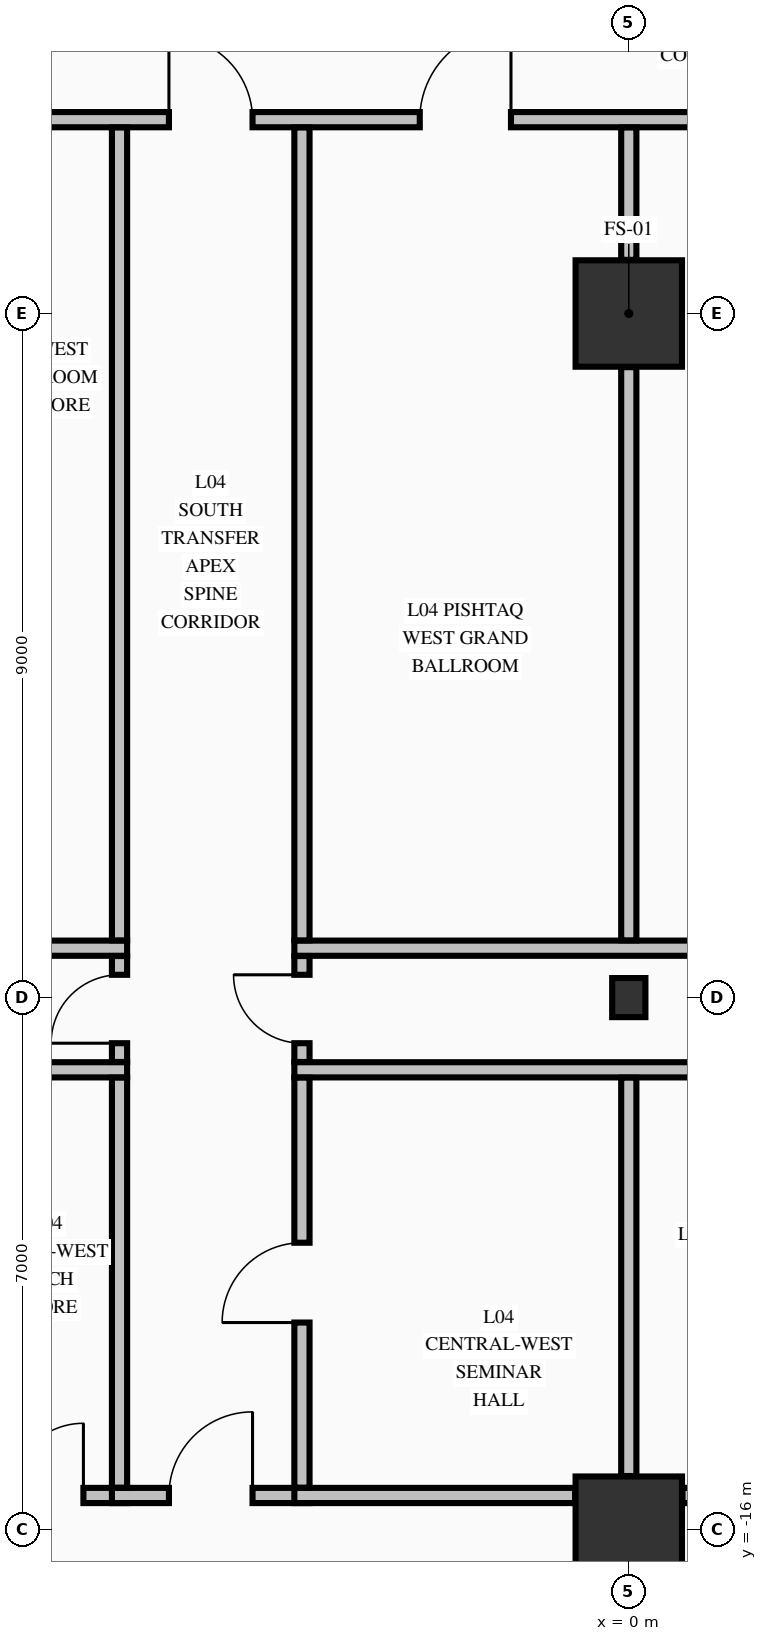
"""IFC4 building model, lengths in metres.
Left out: names, types, materials, properties, quantities, classifications, styles, units other than length and angle.
Written with IfcOpenShell. Run it as: python <this file> out.ifc"""

import sys

from ifc_helpers import new_model, si_unit, direction, frame, frame_2d, origin, origin_2d, place, context, subcontext, project, spatial, rectangle, i_section, extrude, element, fill, save


model = new_model("IFC4")
c1 = context("Model", 3, precision=1e-05, world=origin(), true_north=direction((0.0, 1.0)))
c2 = subcontext(c1, "Body", "Model", "MODEL_VIEW")
j1 = project(units=[si_unit("LENGTHUNIT", "METRE"), si_unit("PLANEANGLEUNIT", "RADIAN")], contexts=[c1])
p1 = place(None, origin())
s1 = spatial("IfcSite", under=j1, at=p1, CompositionType="ELEMENT")
p2 = place(p1, origin())
s2 = spatial("IfcBuilding", under=s1, at=p2, CompositionType="ELEMENT")
p3 = place(p2, frame((0.0, 0.0, 21.76)))
s3 = spatial("IfcBuildingStorey", under=s2, at=p3, CompositionType="ELEMENT", Elevation=21.76)
p4 = place(p3, frame((0.0, -16.0, -0.45), z_axis=(0.0, 0.0, 1.0), x_axis=(1.0, 0.0, 0.0)))
e1 = element("IfcColumn", 1, at=p4, inside=s3, PredefinedType="COLUMN", context=c2, shape_type="SweptSolid", body=[
    extrude(rectangle(XDim=1.4, YDim=1.4, at=origin_2d()), origin(), (0.0, 0.0, 1.0), 5.44),
])
p5 = place(p3, frame((0.0, -9.0, -0.45), z_axis=(0.0, 0.0, 1.0), x_axis=(1.0, 0.0, 0.0)))
e2 = element("IfcColumn", 2, at=p5, inside=s3, PredefinedType="COLUMN", context=c2, shape_type="SweptSolid", body=[
    extrude(i_section(OverallWidth=0.437, OverallDepth=0.514, WebThickness=0.061, FlangeThickness=0.097, FilletRadius=0.015, at=origin_2d()), origin(), (0.0, 0.0, 1.0), 5.44),
])
p6 = place(p3, frame((0.0, 0.0, -0.45), z_axis=(0.0, 0.0, 1.0), x_axis=(1.0, 0.0, 0.0)))
e3 = element("IfcColumn", 3, at=p6, inside=s3, PredefinedType="COLUMN", context=c2, shape_type="SweptSolid", body=[
    extrude(rectangle(XDim=1.4, YDim=1.4, at=origin_2d()), origin(), (0.0, 0.0, 1.0), 5.44),
])
p7 = place(p3, frame((-8.7, -15.55, 0.0), z_axis=(0.0, 0.0, 1.0), x_axis=(1.0, 0.0, 0.0)))
e4 = element("IfcWall", 4, at=p7, inside=s3, PredefinedType="PARTITIONING", context=c2, shape_type="SweptSolid", body=[
    extrude(rectangle(XDim=2.1, YDim=0.2, at=frame_2d((1.05, 0.0))), origin(), (0.0, 0.0, 1.0), 3.332),
])
p8 = place(p7, frame((0.575, 0.0, 0.0)))
e5 = element("IfcOpeningElement", 5, at=p8, cuts=e4, PredefinedType="OPENING", context=c2, shape_type="SweptSolid", body=[
    extrude(rectangle(XDim=0.95, YDim=2.15, at=frame_2d((0.475, 1.075))), frame((0.0, 0.11, 0.0), z_axis=(0.0, -1.0, 0.0), x_axis=(1.0, 0.0, 0.0)), (0.0, 0.0, 1.0), 0.22),
])
p9 = place(p3, frame((-6.8, -15.55, 0.0), z_axis=(0.0, 0.0, 1.0), x_axis=(1.0, 0.0, 0.0)))
e6 = element("IfcWall", 6, at=p9, inside=s3, PredefinedType="PARTITIONING", context=c2, shape_type="SweptSolid", body=[
    extrude(rectangle(XDim=2.6, YDim=0.2, at=frame_2d((1.3, 0.0))), origin(), (0.0, 0.0, 1.0), 3.332),
])
p10 = place(p9, frame((0.75, 0.0, 0.0)))
e7 = element("IfcOpeningElement", 7, at=p10, cuts=e6, PredefinedType="OPENING", context=c2, shape_type="SweptSolid", body=[
    extrude(rectangle(XDim=1.1, YDim=2.15, at=frame_2d((0.55, 1.075))), frame((0.0, 0.11, 0.0), z_axis=(0.0, -1.0, 0.0), x_axis=(1.0, 0.0, 0.0)), (0.0, 0.0, 1.0), 0.22),
])
p11 = place(p3, frame((-4.4, -15.55, 0.0), z_axis=(0.0, 0.0, 1.0), x_axis=(1.0, 0.0, 0.0)))
e8 = element("IfcWall", 8, at=p11, inside=s3, PredefinedType="PARTITIONING", context=c2, shape_type="SweptSolid", body=[
    extrude(rectangle(XDim=3.694, YDim=0.2, at=frame_2d((1.847, 0.0))), origin(), (0.0, 0.0, 1.0), 3.332),
])
p12 = place(p3, frame((0.706, -15.55, 0.0), z_axis=(0.0, 0.0, 1.0), x_axis=(1.0, 0.0, 0.0)))
e9 = element("IfcWall", 9, at=p12, inside=s3, PredefinedType="PARTITIONING", context=c2, shape_type="SweptSolid", body=[
    extrude(rectangle(XDim=7.994, YDim=0.2, at=frame_2d((3.997, 0.0))), origin(), (0.0, 0.0, 1.0), 3.332),
])
p13 = place(p12, frame((2.994, 0.0, 0.0)))
e10 = element("IfcOpeningElement", 10, at=p13, cuts=e9, PredefinedType="OPENING", context=c2, shape_type="SweptSolid", body=[
    extrude(rectangle(XDim=1.2, YDim=2.15, at=frame_2d((0.6, 1.075))), frame((0.0, 0.11, 0.0), z_axis=(0.0, -1.0, 0.0), x_axis=(1.0, 0.0, 0.0)), (0.0, 0.0, 1.0), 0.22),
])
p14 = place(p3, frame((-11.0, -9.95, 0.0), z_axis=(0.0, 0.0, 1.0), x_axis=(1.0, 0.0, 0.0)))
e11 = element("IfcWall", 11, at=p14, inside=s3, PredefinedType="PARTITIONING", context=c2, shape_type="SweptSolid", body=[
    extrude(rectangle(XDim=4.4, YDim=0.2, at=frame_2d((2.2, 0.0))), origin(), (0.0, 0.0, 1.0), 3.332),
])
p15 = place(p3, frame((-4.4, -9.95, 0.0), z_axis=(0.0, 0.0, 1.0), x_axis=(1.0, 0.0, 0.0)))
e12 = element("IfcWall", 12, at=p15, inside=s3, PredefinedType="PARTITIONING", context=c2, shape_type="SweptSolid", body=[
    extrude(rectangle(XDim=15.4, YDim=0.2, at=frame_2d((7.7, 0.0))), origin(), (0.0, 0.0, 1.0), 3.332),
])
p16 = place(p3, frame((-10.194, -8.35, 0.0), z_axis=(0.0, 0.0, 1.0), x_axis=(1.0, 0.0, 0.0)))
e13 = element("IfcWall", 13, at=p16, inside=s3, PredefinedType="PARTITIONING", context=c2, shape_type="SweptSolid", body=[
    extrude(rectangle(XDim=3.594, YDim=0.2, at=frame_2d((1.797, 0.0))), origin(), (0.0, 0.0, 1.0), 3.332),
])
p17 = place(p3, frame((-4.4, -8.35, 0.0), z_axis=(0.0, 0.0, 1.0), x_axis=(1.0, 0.0, 0.0)))
e14 = element("IfcWall", 14, at=p17, inside=s3, PredefinedType="PARTITIONING", context=c2, shape_type="SweptSolid", body=[
    extrude(rectangle(XDim=14.594, YDim=0.2, at=frame_2d((7.297, 0.0))), origin(), (0.0, 0.0, 1.0), 3.332),
])
p18 = place(p3, frame((-8.7, 2.55, 0.0), z_axis=(0.0, 0.0, 1.0), x_axis=(1.0, 0.0, 0.0)))
e15 = element("IfcWall", 15, at=p18, inside=s3, PredefinedType="PARTITIONING", context=c2, shape_type="SweptSolid", body=[
    extrude(rectangle(XDim=17.4, YDim=0.2, at=frame_2d((8.7, 0.0))), origin(), (0.0, 0.0, 1.0), 4.99),
])
p19 = place(p18, frame((2.65, 0.0, 0.0)))
e16 = element("IfcOpeningElement", 16, at=p19, cuts=e15, PredefinedType="OPENING", context=c2, shape_type="SweptSolid", body=[
    extrude(rectangle(XDim=1.1, YDim=2.15, at=frame_2d((0.55, 1.075))), frame((0.0, 0.11, 0.0), z_axis=(0.0, -1.0, 0.0), x_axis=(1.0, 0.0, 0.0)), (0.0, 0.0, 1.0), 0.22),
])
p20 = place(p18, frame((5.95, 0.0, 0.0)))
e17 = element("IfcOpeningElement", 17, at=p20, cuts=e15, PredefinedType="OPENING", context=c2, shape_type="SweptSolid", body=[
    extrude(rectangle(XDim=1.2, YDim=2.15, at=frame_2d((0.6, 1.075))), frame((0.0, 0.11, 0.0), z_axis=(0.0, -1.0, 0.0), x_axis=(1.0, 0.0, 0.0)), (0.0, 0.0, 1.0), 0.22),
])
p21 = place(p3, frame((-6.7, -15.447, 0.0), z_axis=(0.0, 0.0, 1.0), x_axis=(0.0, 1.0, 0.0)))
e18 = element("IfcWall", 18, at=p21, inside=s3, PredefinedType="PARTITIONING", context=c2, shape_type="SweptSolid", body=[
    extrude(rectangle(XDim=5.394, YDim=0.2, at=frame_2d((2.697, 0.0))), origin(), (0.0, 0.0, 1.0), 4.99),
])
p22 = place(p3, frame((-6.7, -9.847, 0.0), z_axis=(0.0, 0.0, 1.0), x_axis=(0.0, 1.0, 0.0)))
e19 = element("IfcWall", 19, at=p22, inside=s3, PredefinedType="PARTITIONING", context=c2, shape_type="SweptSolid", body=[
    extrude(rectangle(XDim=1.394, YDim=0.2, at=frame_2d((0.697, 0.0))), origin(), (0.0, 0.0, 1.0), 4.99),
])
p23 = place(p22, frame((0.247, 0.0, 0.0)))
e20 = element("IfcOpeningElement", 20, at=p23, cuts=e19, PredefinedType="OPENING", context=c2, shape_type="SweptSolid", body=[
    extrude(rectangle(XDim=0.9, YDim=2.15, at=frame_2d((0.45, 1.075))), frame((0.0, 0.11, 0.0), z_axis=(0.0, -1.0, 0.0), x_axis=(1.0, 0.0, 0.0)), (0.0, 0.0, 1.0), 0.22),
])
p24 = place(p3, frame((-6.7, -8.247, 0.0), z_axis=(0.0, 0.0, 1.0), x_axis=(0.0, 1.0, 0.0)))
e21 = element("IfcWall", 21, at=p24, inside=s3, PredefinedType="PARTITIONING", context=c2, shape_type="SweptSolid", body=[
    extrude(rectangle(XDim=10.694, YDim=0.2, at=frame_2d((5.347, 0.0))), origin(), (0.0, 0.0, 1.0), 4.99),
])
p25 = place(p3, frame((-4.3, -15.447, 0.0), z_axis=(0.0, 0.0, 1.0), x_axis=(0.0, 1.0, 0.0)))
e22 = element("IfcWall", 22, at=p25, inside=s3, PredefinedType="PARTITIONING", context=c2, shape_type="SweptSolid", body=[
    extrude(rectangle(XDim=5.394, YDim=0.2, at=frame_2d((2.697, 0.0))), origin(), (0.0, 0.0, 1.0), 4.99),
])
p26 = place(p25, frame((2.172, 0.0, 0.0)))
e23 = element("IfcOpeningElement", 23, at=p26, cuts=e22, PredefinedType="OPENING", context=c2, shape_type="SweptSolid", body=[
    extrude(rectangle(XDim=1.05, YDim=2.15, at=frame_2d((0.525, 1.075))), frame((0.0, 0.11, 0.0), z_axis=(0.0, -1.0, 0.0), x_axis=(1.0, 0.0, 0.0)), (0.0, 0.0, 1.0), 0.22),
])
p27 = place(p3, frame((-4.3, -9.847, 0.0), z_axis=(0.0, 0.0, 1.0), x_axis=(0.0, 1.0, 0.0)))
e24 = element("IfcWall", 24, at=p27, inside=s3, PredefinedType="PARTITIONING", context=c2, shape_type="SweptSolid", body=[
    extrude(rectangle(XDim=1.394, YDim=0.2, at=frame_2d((0.697, 0.0))), origin(), (0.0, 0.0, 1.0), 4.99),
])
p28 = place(p27, frame((0.247, 0.0, 0.0)))
e25 = element("IfcOpeningElement", 25, at=p28, cuts=e24, PredefinedType="OPENING", context=c2, shape_type="SweptSolid", body=[
    extrude(rectangle(XDim=0.9, YDim=2.15, at=frame_2d((0.45, 1.075))), frame((0.0, 0.11, 0.0), z_axis=(0.0, -1.0, 0.0), x_axis=(1.0, 0.0, 0.0)), (0.0, 0.0, 1.0), 0.22),
])
p29 = place(p3, frame((-4.3, -8.247, 0.0), z_axis=(0.0, 0.0, 1.0), x_axis=(0.0, 1.0, 0.0)))
e26 = element("IfcWall", 26, at=p29, inside=s3, PredefinedType="PARTITIONING", context=c2, shape_type="SweptSolid", body=[
    extrude(rectangle(XDim=10.694, YDim=0.2, at=frame_2d((5.347, 0.0))), origin(), (0.0, 0.0, 1.0), 4.99),
])
p30 = place(p3, frame((0.0, -15.294, 0.0), z_axis=(0.0, 0.0, 1.0), x_axis=(0.0, 1.0, 0.0)))
e27 = element("IfcWall", 27, at=p30, inside=s3, PredefinedType="PARTITIONING", context=c2, shape_type="SweptSolid", body=[
    extrude(rectangle(XDim=5.241, YDim=0.2, at=frame_2d((2.621, 0.0))), origin(), (0.0, 0.0, 1.0), 3.332),
])
p31 = place(p3, frame((0.0, -8.247, 0.0), z_axis=(0.0, 0.0, 1.0), x_axis=(0.0, 1.0, 0.0)))
e28 = element("IfcWall", 28, at=p31, inside=s3, PredefinedType="PARTITIONING", context=c2, shape_type="SweptSolid", body=[
    extrude(rectangle(XDim=7.541, YDim=0.2, at=frame_2d((3.771, 0.0))), origin(), (0.0, 0.0, 1.0), 3.332),
])
p32 = place(p3, frame((0.0, 0.706, 0.0), z_axis=(0.0, 0.0, 1.0), x_axis=(0.0, 1.0, 0.0)))
e29 = element("IfcWall", 29, at=p32, inside=s3, PredefinedType="PARTITIONING", context=c2, shape_type="SweptSolid", body=[
    extrude(rectangle(XDim=1.741, YDim=0.2, at=frame_2d((0.871, 0.0))), origin(), (0.0, 0.0, 1.0), 3.332),
])
p33 = place(p10, origin())
e30 = element("IfcDoor", 30, at=p33, inside=s3, OperationType="SINGLE_SWING_RIGHT", PredefinedType="DOOR", context=c2, shape_type="SweptSolid", body=[
    extrude(rectangle(XDim=1.1, YDim=2.15, at=frame_2d((0.55, 1.075))), frame((0.0, 0.025, 0.0), z_axis=(0.0, -1.0, 0.0), x_axis=(1.0, 0.0, 0.0)), (0.0, 0.0, 1.0), 0.05),
])
fill(e7, e30)
p34 = place(p19, origin())
e31 = element("IfcDoor", 31, at=p34, inside=s3, OperationType="SINGLE_SWING_LEFT", PredefinedType="DOOR", context=c2, shape_type="SweptSolid", body=[
    extrude(rectangle(XDim=1.1, YDim=2.15, at=frame_2d((0.55, 1.075))), frame((0.0, 0.025, 0.0), z_axis=(0.0, -1.0, 0.0), x_axis=(1.0, 0.0, 0.0)), (0.0, 0.0, 1.0), 0.05),
])
fill(e16, e31)
p35 = place(p8, origin())
e32 = element("IfcDoor", 32, at=p35, inside=s3, OperationType="SINGLE_SWING_RIGHT", PredefinedType="DOOR", context=c2, shape_type="SweptSolid", body=[
    extrude(rectangle(XDim=0.95, YDim=2.15, at=frame_2d((0.475, 1.075))), frame((0.0, 0.025, 0.0), z_axis=(0.0, -1.0, 0.0), x_axis=(1.0, 0.0, 0.0)), (0.0, 0.0, 1.0), 0.05),
])
fill(e5, e32)
p36 = place(p26, origin())
e33 = element("IfcDoor", 33, at=p36, inside=s3, OperationType="SINGLE_SWING_LEFT", PredefinedType="DOOR", context=c2, shape_type="SweptSolid", body=[
    extrude(rectangle(XDim=1.05, YDim=2.15, at=frame_2d((0.525, 1.075))), frame((0.0, 0.025, 0.0), z_axis=(0.0, -1.0, 0.0), x_axis=(1.0, 0.0, 0.0)), (0.0, 0.0, 1.0), 0.05),
])
fill(e23, e33)
p37 = place(p23, origin())
e34 = element("IfcDoor", 34, at=p37, inside=s3, OperationType="SINGLE_SWING_LEFT", PredefinedType="DOOR", context=c2, shape_type="SweptSolid", body=[
    extrude(rectangle(XDim=0.9, YDim=2.15, at=frame_2d((0.45, 1.075))), frame((0.0, 0.025, 0.0), z_axis=(0.0, -1.0, 0.0), x_axis=(1.0, 0.0, 0.0)), (0.0, 0.0, 1.0), 0.05),
])
fill(e20, e34)
p38 = place(p28, origin())
e35 = element("IfcDoor", 35, at=p38, inside=s3, OperationType="SINGLE_SWING_RIGHT", PredefinedType="DOOR", context=c2, shape_type="SweptSolid", body=[
    extrude(rectangle(XDim=0.9, YDim=2.15, at=frame_2d((0.45, 1.075))), frame((0.0, 0.025, 0.0), z_axis=(0.0, -1.0, 0.0), x_axis=(1.0, 0.0, 0.0)), (0.0, 0.0, 1.0), 0.05),
])
fill(e25, e35)
p39 = place(p20, origin())
e36 = element("IfcDoor", 36, at=p39, inside=s3, OperationType="SINGLE_SWING_RIGHT", PredefinedType="DOOR", context=c2, shape_type="SweptSolid", body=[
    extrude(rectangle(XDim=1.2, YDim=2.15, at=frame_2d((0.6, 1.075))), frame((0.0, 0.025, 0.0), z_axis=(0.0, -1.0, 0.0), x_axis=(1.0, 0.0, 0.0)), (0.0, 0.0, 1.0), 0.05),
])
fill(e17, e36)
save(model, sys.argv[1])
